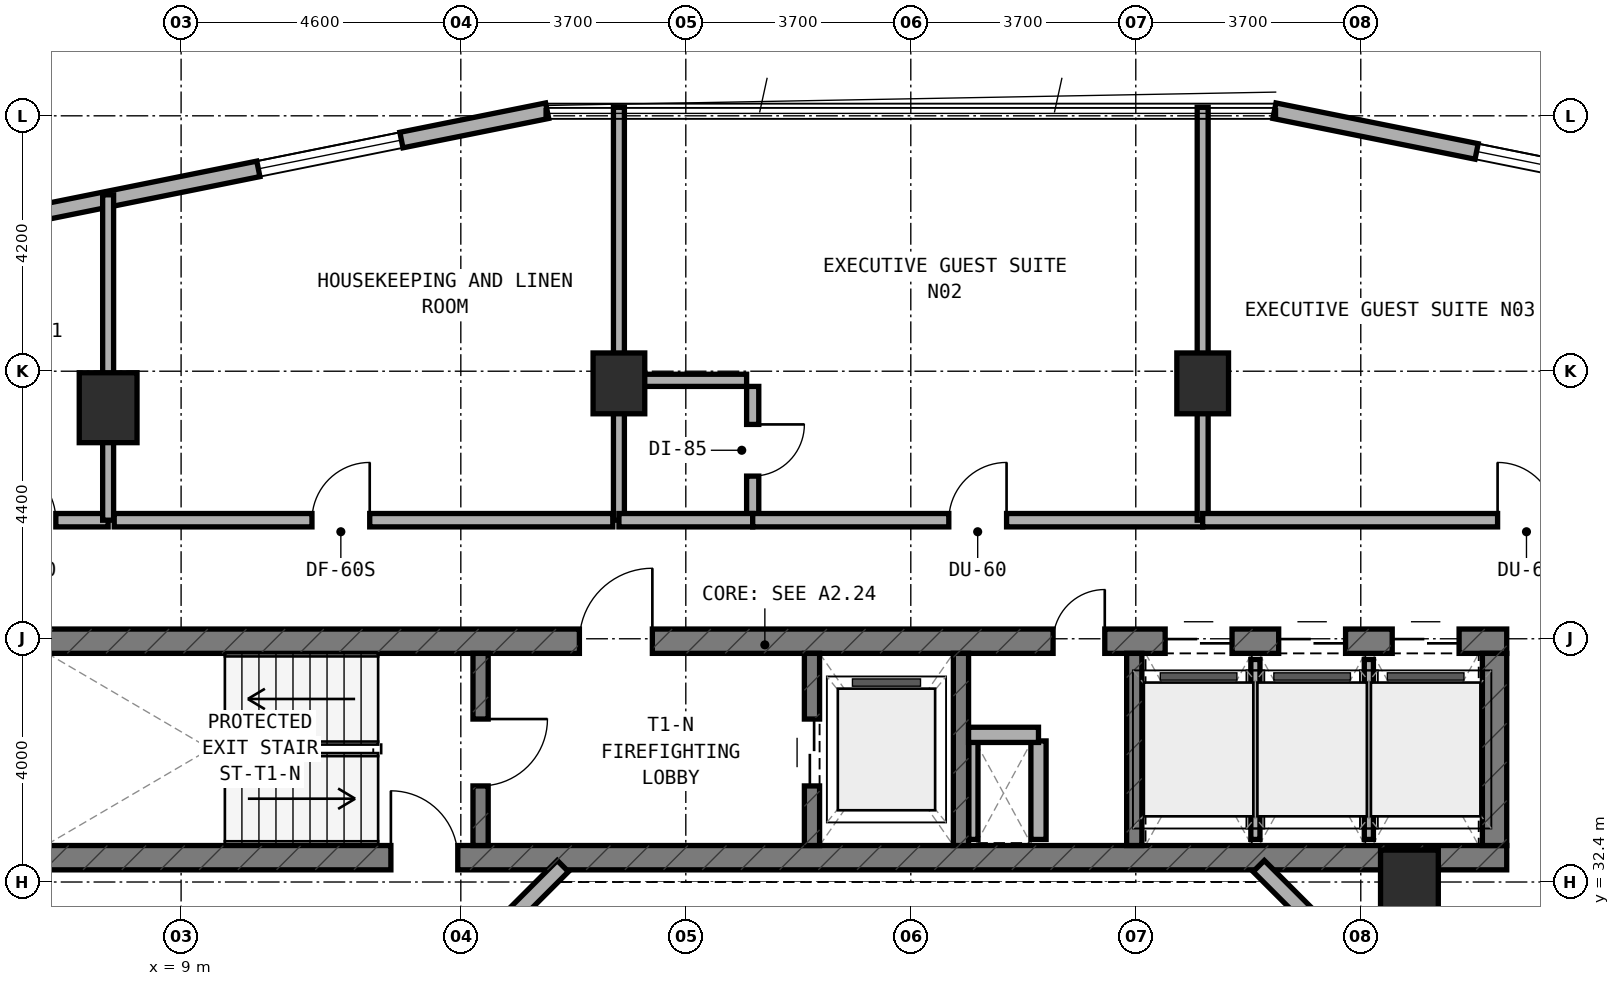
"""IFC4 building model, lengths in metres.
Left out: names, types, materials, properties, quantities, classifications, styles, units other than length and angle.
Written with IfcOpenShell. Run it as: python <this file> out.ifc"""

import sys

from ifc_helpers import new_model, si_unit, direction, frame, frame_2d, origin, origin_2d, place, context, subcontext, project, spatial, rectangle, extrude, element, fill, save


model = new_model("IFC4")
c1 = context("Model", 3, precision=1e-05, world=origin(), true_north=direction((0.0, 1.0)))
c2 = subcontext(c1, "Body", "Model", "MODEL_VIEW")
j1 = project(units=[si_unit("LENGTHUNIT", "METRE"), si_unit("PLANEANGLEUNIT", "RADIAN")], contexts=[c1])
p1 = place(None, origin())
s1 = spatial("IfcSite", under=j1, at=p1, CompositionType="ELEMENT")
p2 = place(p1, origin())
s2 = spatial("IfcBuilding", under=s1, at=p2, CompositionType="ELEMENT")
p3 = place(p2, frame((0.0, 0.0, 109.0)))
s3 = spatial("IfcBuildingStorey", under=s2, at=p3, CompositionType="ELEMENT", Elevation=109.0)
p4 = place(p3, frame((6.4, 32.8, 0.0), z_axis=(0.0, 0.0, 1.0), x_axis=(1.0, 0.0, 0.0)))
e1 = element("IfcWall", 1, at=p4, inside=s3, PredefinedType="SHEAR", context=c2, shape_type="SweptSolid", body=[
    extrude(rectangle(XDim=24.4, YDim=0.4, at=frame_2d((12.2, 0.0))), origin(), (0.0, 0.0, 1.0), 3.5),
])
p5 = place(p4, frame((6.05, 0.0, 0.0)))
e2 = element("IfcOpeningElement", 2, at=p5, cuts=e1, PredefinedType="OPENING", context=c2, shape_type="SweptSolid", body=[
    extrude(rectangle(XDim=1.1, YDim=2.15, at=frame_2d((0.55, 1.075))), frame((0.0, 0.21, 0.0), z_axis=(0.0, -1.0, 0.0), x_axis=(1.0, 0.0, 0.0)), (0.0, 0.0, 1.0), 0.42),
])
p6 = place(p3, frame((6.4, 36.36, 0.0), z_axis=(0.0, 0.0, 1.0), x_axis=(1.0, 0.0, 0.0)))
e3 = element("IfcWall", 3, at=p6, inside=s3, PredefinedType="SHEAR", context=c2, shape_type="SweptSolid", body=[
    extrude(rectangle(XDim=24.4, YDim=0.4, at=frame_2d((12.2, 0.0))), origin(), (0.0, 0.0, 1.0), 3.5),
])
p7 = place(p6, frame((9.15, 0.0, 0.0)))
e4 = element("IfcOpeningElement", 4, at=p7, cuts=e3, PredefinedType="OPENING", context=c2, shape_type="SweptSolid", body=[
    extrude(rectangle(XDim=1.2, YDim=2.15, at=frame_2d((0.6, 1.075))), frame((0.0, 0.21, 0.0), z_axis=(0.0, -1.0, 0.0), x_axis=(1.0, 0.0, 0.0)), (0.0, 0.0, 1.0), 0.42),
])
p8 = place(p6, frame((16.94, 0.0, 0.0)))
e5 = element("IfcOpeningElement", 5, at=p8, cuts=e3, PredefinedType="OPENING", context=c2, shape_type="SweptSolid", body=[
    extrude(rectangle(XDim=0.85, YDim=2.1, at=frame_2d((0.425, 1.05))), frame((0.0, 0.21, 0.0), z_axis=(0.0, -1.0, 0.0), x_axis=(1.0, 0.0, 0.0)), (0.0, 0.0, 1.0), 0.42),
])
p9 = place(p6, frame((18.783, 0.0, 0.0)))
e6 = element("IfcOpeningElement", 6, at=p9, cuts=e3, PredefinedType="OPENING", context=c2, shape_type="SweptSolid", body=[
    extrude(rectangle(XDim=1.1, YDim=2.15, at=frame_2d((0.55, 1.075))), frame((0.0, 0.21, 0.0), z_axis=(0.0, -1.0, 0.0), x_axis=(1.0, 0.0, 0.0)), (0.0, 0.0, 1.0), 0.42),
])
p10 = place(p6, frame((20.65, 0.0, 0.0)))
e7 = element("IfcOpeningElement", 7, at=p10, cuts=e3, PredefinedType="OPENING", context=c2, shape_type="SweptSolid", body=[
    extrude(rectangle(XDim=1.1, YDim=2.15, at=frame_2d((0.55, 1.075))), frame((0.0, 0.21, 0.0), z_axis=(0.0, -1.0, 0.0), x_axis=(1.0, 0.0, 0.0)), (0.0, 0.0, 1.0), 0.42),
])
p11 = place(p6, frame((22.517, 0.0, 0.0)))
e8 = element("IfcOpeningElement", 8, at=p11, cuts=e3, PredefinedType="OPENING", context=c2, shape_type="SweptSolid", body=[
    extrude(rectangle(XDim=1.1, YDim=2.15, at=frame_2d((0.55, 1.075))), frame((0.0, 0.21, 0.0), z_axis=(0.0, -1.0, 0.0), x_axis=(1.0, 0.0, 0.0)), (0.0, 0.0, 1.0), 0.42),
])
p12 = place(p3, frame((30.6, 33.0, 0.0), z_axis=(0.0, 0.0, 1.0), x_axis=(0.0, 1.0, 0.0)))
e9 = element("IfcWall", 9, at=p12, inside=s3, PredefinedType="SHEAR", context=c2, shape_type="SweptSolid", body=[
    extrude(rectangle(XDim=3.16, YDim=0.4, at=frame_2d((1.58, 0.0))), origin(), (0.0, 0.0, 1.0), 3.5),
])
p13 = place(p3, frame((13.925, 33.0, 0.0), z_axis=(0.0, 0.0, 1.0), x_axis=(0.0, 1.0, 0.0)))
e10 = element("IfcWall", 10, at=p13, inside=s3, PredefinedType="STANDARD", context=c2, shape_type="SweptSolid", body=[
    extrude(rectangle(XDim=3.16, YDim=0.25, at=frame_2d((1.58, 0.0))), origin(), (0.0, 0.0, 1.0), 3.22),
])
p14 = place(p13, frame((0.98, 0.0, 0.0)))
e11 = element("IfcOpeningElement", 11, at=p14, cuts=e10, PredefinedType="OPENING", context=c2, shape_type="SweptSolid", body=[
    extrude(rectangle(XDim=1.1, YDim=2.15, at=frame_2d((0.55, 1.075))), frame((0.0, 0.135, 0.0), z_axis=(0.0, -1.0, 0.0), x_axis=(1.0, 0.0, 0.0)), (0.0, 0.0, 1.0), 0.27),
])
p15 = place(p3, frame((19.375, 33.0, 0.0), z_axis=(0.0, 0.0, 1.0), x_axis=(0.0, 1.0, 0.0)))
e12 = element("IfcWall", 12, at=p15, inside=s3, PredefinedType="STANDARD", context=c2, shape_type="SweptSolid", body=[
    extrude(rectangle(XDim=3.16, YDim=0.25, at=frame_2d((1.58, 0.0))), origin(), (0.0, 0.0, 1.0), 3.22),
])
p16 = place(p15, frame((0.98, 0.0, 0.0)))
e13 = element("IfcOpeningElement", 13, at=p16, cuts=e12, PredefinedType="OPENING", context=c2, shape_type="SweptSolid", body=[
    extrude(rectangle(XDim=1.1, YDim=2.15, at=frame_2d((0.55, 1.075))), frame((0.0, 0.135, 0.0), z_axis=(0.0, -1.0, 0.0), x_axis=(1.0, 0.0, 0.0)), (0.0, 0.0, 1.0), 0.27),
])
for number, where, z_axis, x_axis in (
    (14, (21.825, 33.0, 0.0), (0.0, 0.0, 1.0), (0.0, 1.0, 0.0)),
    (15, (24.675, 33.0, 0.0), (0.0, 0.0, 1.0), (0.0, 1.0, 0.0)),
):
    element("IfcWall", number, at=place(p3, frame(where, z_axis=z_axis, x_axis=x_axis)), inside=s3, PredefinedType="STANDARD", context=c2, shape_type="SweptSolid", body=[
        extrude(rectangle(XDim=3.16, YDim=0.25, at=frame_2d((1.58, 0.0))), origin(), (0.0, 0.0, 1.0), 3.22),
    ])
for number, where, z_axis, x_axis in (
    (16, (16.2, 40.6, 0.0), (0.0, 0.0, 1.0), (1.0, 0.0, 0.0)),
    (17, (25.8, 40.6, 0.0), (0.0, 0.0, 1.0), (1.0, 0.0, 0.0)),
):
    element("IfcColumn", number, at=place(p3, frame(where, z_axis=z_axis, x_axis=x_axis)), inside=s3, PredefinedType="COLUMN", context=c2, shape_type="SweptSolid", body=[
        extrude(rectangle(XDim=0.85, YDim=1.0, at=origin_2d()), origin(), (0.0, 0.0, 1.0), 3.5),
    ])
for number, where, z_axis, x_axis in (
    (18, (7.8, 40.2, 0.0), (0.0, 0.0, 1.0), (1.0, 0.0, 0.0)),
    (19, (29.2, 32.35, 0.0), (0.0, 0.0, 1.0), (1.0, 0.0, 0.0)),
):
    element("IfcColumn", number, at=place(p3, frame(where, z_axis=z_axis, x_axis=x_axis)), inside=s3, PredefinedType="COLUMN", context=c2, shape_type="SweptSolid", body=[
        extrude(rectangle(XDim=0.95, YDim=1.15, at=origin_2d()), origin(), (0.0, 0.0, 1.0), 3.5),
    ])
p17 = place(p3, frame((35.982, 43.271, 0.0), z_axis=(0.0, 0.0, 1.0), x_axis=(-0.980315963543, 0.197435082048, 0.0)))
e20 = element("IfcWall", 20, at=p17, inside=s3, PredefinedType="STANDARD", context=c2, shape_type="SweptSolid", body=[
    extrude(rectangle(XDim=9.183, YDim=0.26, at=frame_2d((4.591, 0.0))), origin(), (0.0, 0.0, 1.0), 3.22),
])
p18 = place(p17, frame((3.391, 0.0, 0.8)))
e21 = element("IfcOpeningElement", 21, at=p18, cuts=e20, PredefinedType="OPENING", context=c2, shape_type="SweptSolid", body=[
    extrude(rectangle(XDim=2.4, YDim=1.6, at=frame_2d((1.2, 0.8))), frame((0.0, 0.14, 0.0), z_axis=(0.0, -1.0, 0.0), x_axis=(1.0, 0.0, 0.0)), (0.0, 0.0, 1.0), 0.28),
])
p19 = place(p3, frame((15.02, 45.084, 0.0), z_axis=(0.0, 0.0, 1.0), x_axis=(-0.980315963543, -0.197435082048, 0.0)))
e22 = element("IfcWall", 22, at=p19, inside=s3, PredefinedType="STANDARD", context=c2, shape_type="SweptSolid", body=[
    extrude(rectangle(XDim=9.183, YDim=0.26, at=frame_2d((4.591, 0.0))), origin(), (0.0, 0.0, 1.0), 3.22),
])
p20 = place(p19, frame((2.445, 0.0, 0.8)))
e23 = element("IfcOpeningElement", 23, at=p20, cuts=e22, PredefinedType="OPENING", context=c2, shape_type="SweptSolid", body=[
    extrude(rectangle(XDim=2.4, YDim=1.6, at=frame_2d((1.2, 0.8))), frame((0.0, 0.14, 0.0), z_axis=(0.0, -1.0, 0.0), x_axis=(1.0, 0.0, 0.0)), (0.0, 0.0, 1.0), 0.28),
])
for number, where, z_axis, x_axis in (
    (24, (28.556, 30.828, 0.0), (0.0, 0.0, 1.0), (-0.707, 0.707, 0.0)),
    (25, (15.278, 32.662, 0.0), (0.0, 0.0, 1.0), (-0.707, -0.707, 0.0)),
):
    element("IfcWall", number, at=place(p3, frame(where, z_axis=z_axis, x_axis=x_axis)), inside=s3, PredefinedType="STANDARD", context=c2, shape_type="SweptSolid", body=[
        extrude(rectangle(XDim=2.594, YDim=0.26, at=frame_2d((1.297, 0.0))), origin(), (0.0, 0.0, 1.0), 3.22),
    ])
p21 = place(p3, frame((22.03, 33.1, 0.0), z_axis=(0.0, 0.0, 1.0), x_axis=(0.0, 1.0, 0.0)))
e26 = element("IfcWall", 26, at=p21, inside=s3, PredefinedType="PARTITIONING", context=c2, shape_type="SweptSolid", body=[
    extrude(rectangle(XDim=1.62, YDim=0.15, at=frame_2d((0.81, 0.0))), origin(), (0.0, 0.0, 1.0), 3.22),
])
p22 = place(p3, frame((23.1, 33.1, 0.0), z_axis=(0.0, 0.0, 1.0), x_axis=(0.0, 1.0, 0.0)))
e27 = element("IfcWall", 27, at=p22, inside=s3, PredefinedType="SOLIDWALL", context=c2, shape_type="SweptSolid", body=[
    extrude(rectangle(XDim=1.62, YDim=0.25, at=frame_2d((0.81, 0.0))), origin(), (0.0, 0.0, 1.0), 3.22),
])
p23 = place(p3, frame((21.95, 34.82, 0.0), z_axis=(0.0, 0.0, 1.0), x_axis=(1.0, 0.0, 0.0)))
e28 = element("IfcWall", 28, at=p23, inside=s3, PredefinedType="SOLIDWALL", context=c2, shape_type="SweptSolid", body=[
    extrude(rectangle(XDim=1.15, YDim=0.25, at=frame_2d((0.575, 0.0))), origin(), (0.0, 0.0, 1.0), 3.22),
])
p24 = place(p3, frame((26.667, 33.1, 0.0), z_axis=(0.0, 0.0, 1.0), x_axis=(0.0, 1.0, 0.0)))
e29 = element("IfcWall", 29, at=p24, inside=s3, PredefinedType="PARTITIONING", context=c2, shape_type="SweptSolid", body=[
    extrude(rectangle(XDim=2.96, YDim=0.15, at=frame_2d((1.48, 0.0))), origin(), (0.0, 0.0, 1.0), 3.22),
])
p25 = place(p3, frame((28.533, 33.1, 0.0), z_axis=(0.0, 0.0, 1.0), x_axis=(0.0, 1.0, 0.0)))
e30 = element("IfcWall", 30, at=p25, inside=s3, PredefinedType="PARTITIONING", context=c2, shape_type="SweptSolid", body=[
    extrude(rectangle(XDim=2.96, YDim=0.15, at=frame_2d((1.48, 0.0))), origin(), (0.0, 0.0, 1.0), 2.595),
])
p26 = place(p3, frame((5.55, 38.35, 0.0), z_axis=(0.0, 0.0, 1.0), x_axis=(1.0, 0.0, 0.0)))
e31 = element("IfcWall", 31, at=p26, inside=s3, PredefinedType="SOLIDWALL", context=c2, shape_type="SweptSolid", body=[
    extrude(rectangle(XDim=2.25, YDim=0.22, at=frame_2d((1.125, 0.0))), origin(), (0.0, 0.0, 1.0), 2.595),
])
p27 = place(p26, frame((0.44, 0.0, 0.0)))
e32 = element("IfcOpeningElement", 32, at=p27, cuts=e31, PredefinedType="OPENING", context=c2, shape_type="SweptSolid", body=[
    extrude(rectangle(XDim=0.95, YDim=2.1, at=frame_2d((0.475, 1.05))), frame((0.0, 0.12, 0.0), z_axis=(0.0, -1.0, 0.0), x_axis=(1.0, 0.0, 0.0)), (0.0, 0.0, 1.0), 0.24),
])
p28 = place(p3, frame((7.8, 38.35, 0.0), z_axis=(0.0, 0.0, 1.0), x_axis=(0.0, 1.0, 0.0)))
e33 = element("IfcWall", 33, at=p28, inside=s3, PredefinedType="SOLIDWALL", context=c2, shape_type="SweptSolid", body=[
    extrude(rectangle(XDim=5.351, YDim=0.18, at=frame_2d((2.675, 0.0))), origin(), (0.0, 0.0, 1.0), 2.595),
])
p29 = place(p3, frame((7.9, 38.35, 0.0), z_axis=(0.0, 0.0, 1.0), x_axis=(1.0, 0.0, 0.0)))
e34 = element("IfcWall", 34, at=p29, inside=s3, PredefinedType="SOLIDWALL", context=c2, shape_type="SweptSolid", body=[
    extrude(rectangle(XDim=8.2, YDim=0.22, at=frame_2d((4.1, 0.0))), origin(), (0.0, 0.0, 1.0), 3.22),
])
p30 = place(p29, frame((3.252, 0.0, 0.0)))
e35 = element("IfcOpeningElement", 35, at=p30, cuts=e34, PredefinedType="OPENING", context=c2, shape_type="SweptSolid", body=[
    extrude(rectangle(XDim=0.95, YDim=2.1, at=frame_2d((0.475, 1.05))), frame((0.0, 0.12, 0.0), z_axis=(0.0, -1.0, 0.0), x_axis=(1.0, 0.0, 0.0)), (0.0, 0.0, 1.0), 0.24),
])
p31 = place(p3, frame((16.2, 38.35, 0.0), z_axis=(0.0, 0.0, 1.0), x_axis=(0.0, 1.0, 0.0)))
e36 = element("IfcWall", 36, at=p31, inside=s3, PredefinedType="SOLIDWALL", context=c2, shape_type="SweptSolid", body=[
    extrude(rectangle(XDim=6.79, YDim=0.18, at=frame_2d((3.395, 0.0))), origin(), (0.0, 0.0, 1.0), 2.595),
])
p32 = place(p3, frame((18.4, 38.45, 0.0), z_axis=(0.0, 0.0, 1.0), x_axis=(0.0, 1.0, 0.0)))
e37 = element("IfcWall", 37, at=p32, inside=s3, PredefinedType="PLUMBINGWALL", context=c2, shape_type="SweptSolid", body=[
    extrude(rectangle(XDim=2.1, YDim=0.2, at=frame_2d((1.05, 0.0))), origin(), (0.0, 0.0, 1.0), 2.835),
])
p33 = place(p32, frame((0.625, 0.0, 0.0)))
e38 = element("IfcOpeningElement", 38, at=p33, cuts=e37, PredefinedType="OPENING", context=c2, shape_type="SweptSolid", body=[
    extrude(rectangle(XDim=0.85, YDim=2.1, at=frame_2d((0.425, 1.05))), frame((0.0, 0.11, 0.0), z_axis=(0.0, -1.0, 0.0), x_axis=(1.0, 0.0, 0.0)), (0.0, 0.0, 1.0), 0.22),
])
p34 = place(p3, frame((16.3, 40.65, 0.0), z_axis=(0.0, 0.0, 1.0), x_axis=(1.0, 0.0, 0.0)))
e39 = element("IfcWall", 39, at=p34, inside=s3, PredefinedType="PLUMBINGWALL", context=c2, shape_type="SweptSolid", body=[
    extrude(rectangle(XDim=2.0, YDim=0.2, at=frame_2d((1.0, 0.0))), origin(), (0.0, 0.0, 1.0), 2.835),
])
p35 = place(p3, frame((16.2, 38.35, 0.0), z_axis=(0.0, 0.0, 1.0), x_axis=(1.0, 0.0, 0.0)))
e40 = element("IfcWall", 40, at=p35, inside=s3, PredefinedType="SOLIDWALL", context=c2, shape_type="SweptSolid", body=[
    extrude(rectangle(XDim=2.2, YDim=0.22, at=frame_2d((1.1, 0.0))), origin(), (0.0, 0.0, 1.0), 2.595),
])
p36 = place(p3, frame((18.4, 38.35, 0.0), z_axis=(0.0, 0.0, 1.0), x_axis=(1.0, 0.0, 0.0)))
e41 = element("IfcWall", 41, at=p36, inside=s3, PredefinedType="SOLIDWALL", context=c2, shape_type="SweptSolid", body=[
    extrude(rectangle(XDim=7.4, YDim=0.22, at=frame_2d((3.7, 0.0))), origin(), (0.0, 0.0, 1.0), 2.595),
])
p37 = place(p36, frame((3.225, 0.0, 0.0)))
e42 = element("IfcOpeningElement", 42, at=p37, cuts=e41, PredefinedType="OPENING", context=c2, shape_type="SweptSolid", body=[
    extrude(rectangle(XDim=0.95, YDim=2.1, at=frame_2d((0.475, 1.05))), frame((0.0, 0.12, 0.0), z_axis=(0.0, -1.0, 0.0), x_axis=(1.0, 0.0, 0.0)), (0.0, 0.0, 1.0), 0.24),
])
p38 = place(p3, frame((25.8, 38.35, 0.0), z_axis=(0.0, 0.0, 1.0), x_axis=(0.0, 1.0, 0.0)))
e43 = element("IfcWall", 43, at=p38, inside=s3, PredefinedType="SOLIDWALL", context=c2, shape_type="SweptSolid", body=[
    extrude(rectangle(XDim=6.79, YDim=0.18, at=frame_2d((3.395, 0.0))), origin(), (0.0, 0.0, 1.0), 2.595),
])
p39 = place(p3, frame((25.8, 38.35, 0.0), z_axis=(0.0, 0.0, 1.0), x_axis=(1.0, 0.0, 0.0)))
e44 = element("IfcWall", 44, at=p39, inside=s3, PredefinedType="SOLIDWALL", context=c2, shape_type="SweptSolid", body=[
    extrude(rectangle(XDim=10.65, YDim=0.22, at=frame_2d((5.325, 0.0))), origin(), (0.0, 0.0, 1.0), 2.595),
])
p40 = place(p39, frame((4.85, 0.0, 0.0)))
e45 = element("IfcOpeningElement", 45, at=p40, cuts=e44, PredefinedType="OPENING", context=c2, shape_type="SweptSolid", body=[
    extrude(rectangle(XDim=0.95, YDim=2.1, at=frame_2d((0.475, 1.05))), frame((0.0, 0.12, 0.0), z_axis=(0.0, -1.0, 0.0), x_axis=(1.0, 0.0, 0.0)), (0.0, 0.0, 1.0), 0.24),
])
p41 = place(p18, origin())
e46 = element("IfcWindow", 46, at=p41, inside=s3, PartitioningType="SINGLE_PANEL", PredefinedType="WINDOW", context=c2, shape_type="SweptSolid", body=[
    extrude(rectangle(XDim=2.4, YDim=1.6, at=frame_2d((1.2, 0.8))), frame((0.0, 0.03, 0.0), z_axis=(0.0, -1.0, 0.0), x_axis=(1.0, 0.0, 0.0)), (0.0, 0.0, 1.0), 0.06),
])
fill(e21, e46)
p42 = place(p20, origin())
e47 = element("IfcWindow", 47, at=p42, inside=s3, PartitioningType="SINGLE_PANEL", PredefinedType="WINDOW", context=c2, shape_type="SweptSolid", body=[
    extrude(rectangle(XDim=2.4, YDim=1.6, at=frame_2d((1.2, 0.8))), frame((0.0, 0.03, 0.0), z_axis=(0.0, -1.0, 0.0), x_axis=(1.0, 0.0, 0.0)), (0.0, 0.0, 1.0), 0.06),
])
fill(e23, e47)
p43 = place(p14, frame((1.1, 0.0, 0.0), z_axis=(0.0, 0.0, 1.0), x_axis=(-1.0, 0.0, 0.0)))
e48 = element("IfcDoor", 48, at=p43, inside=s3, OperationType="SINGLE_SWING_LEFT", PredefinedType="DOOR", context=c2, shape_type="SweptSolid", body=[
    extrude(rectangle(XDim=1.1, YDim=2.15, at=frame_2d((0.55, 1.075))), frame((0.0, 0.025, 0.0), z_axis=(0.0, -1.0, 0.0), x_axis=(1.0, 0.0, 0.0)), (0.0, 0.0, 1.0), 0.05),
])
fill(e11, e48)
p44 = place(p7, origin())
e49 = element("IfcDoor", 49, at=p44, inside=s3, OperationType="SINGLE_SWING_RIGHT", PredefinedType="DOOR", context=c2, shape_type="SweptSolid", body=[
    extrude(rectangle(XDim=1.2, YDim=2.15, at=frame_2d((0.6, 1.075))), frame((0.0, 0.025, 0.0), z_axis=(0.0, -1.0, 0.0), x_axis=(1.0, 0.0, 0.0)), (0.0, 0.0, 1.0), 0.05),
])
fill(e4, e49)
p45 = place(p16, origin())
e50 = element("IfcDoor", 50, at=p45, inside=s3, OperationType="DOUBLE_DOOR_SLIDING", PredefinedType="DOOR", context=c2, shape_type="SweptSolid", body=[
    extrude(rectangle(XDim=1.1, YDim=2.15, at=frame_2d((0.55, 1.075))), frame((0.0, 0.025, 0.0), z_axis=(0.0, -1.0, 0.0), x_axis=(1.0, 0.0, 0.0)), (0.0, 0.0, 1.0), 0.05),
])
fill(e13, e50)
p46 = place(p8, origin())
e51 = element("IfcDoor", 51, at=p46, inside=s3, OperationType="SINGLE_SWING_RIGHT", PredefinedType="DOOR", context=c2, shape_type="SweptSolid", body=[
    extrude(rectangle(XDim=0.85, YDim=2.1, at=frame_2d((0.425, 1.05))), frame((0.0, 0.025, 0.0), z_axis=(0.0, -1.0, 0.0), x_axis=(1.0, 0.0, 0.0)), (0.0, 0.0, 1.0), 0.05),
])
fill(e5, e51)
p47 = place(p9, origin())
e52 = element("IfcDoor", 52, at=p47, inside=s3, OperationType="DOUBLE_DOOR_SLIDING", PredefinedType="DOOR", context=c2, shape_type="SweptSolid", body=[
    extrude(rectangle(XDim=1.1, YDim=2.15, at=frame_2d((0.55, 1.075))), frame((0.0, 0.025, 0.0), z_axis=(0.0, -1.0, 0.0), x_axis=(1.0, 0.0, 0.0)), (0.0, 0.0, 1.0), 0.05),
])
fill(e6, e52)
p48 = place(p10, origin())
e53 = element("IfcDoor", 53, at=p48, inside=s3, OperationType="DOUBLE_DOOR_SLIDING", PredefinedType="DOOR", context=c2, shape_type="SweptSolid", body=[
    extrude(rectangle(XDim=1.1, YDim=2.15, at=frame_2d((0.55, 1.075))), frame((0.0, 0.025, 0.0), z_axis=(0.0, -1.0, 0.0), x_axis=(1.0, 0.0, 0.0)), (0.0, 0.0, 1.0), 0.05),
])
fill(e7, e53)
p49 = place(p11, origin())
e54 = element("IfcDoor", 54, at=p49, inside=s3, OperationType="DOUBLE_DOOR_SLIDING", PredefinedType="DOOR", context=c2, shape_type="SweptSolid", body=[
    extrude(rectangle(XDim=1.1, YDim=2.15, at=frame_2d((0.55, 1.075))), frame((0.0, 0.025, 0.0), z_axis=(0.0, -1.0, 0.0), x_axis=(1.0, 0.0, 0.0)), (0.0, 0.0, 1.0), 0.05),
])
fill(e8, e54)
p50 = place(p5, origin())
e55 = element("IfcDoor", 55, at=p50, inside=s3, OperationType="SINGLE_SWING_LEFT", PredefinedType="DOOR", context=c2, shape_type="SweptSolid", body=[
    extrude(rectangle(XDim=1.1, YDim=2.15, at=frame_2d((0.55, 1.075))), frame((0.0, 0.025, 0.0), z_axis=(0.0, -1.0, 0.0), x_axis=(1.0, 0.0, 0.0)), (0.0, 0.0, 1.0), 0.05),
])
fill(e2, e55)
p51 = place(p27, origin())
e56 = element("IfcDoor", 56, at=p51, inside=s3, OperationType="SINGLE_SWING_LEFT", PredefinedType="DOOR", context=c2, shape_type="SweptSolid", body=[
    extrude(rectangle(XDim=0.95, YDim=2.1, at=frame_2d((0.475, 1.05))), frame((0.0, 0.025, 0.0), z_axis=(0.0, -1.0, 0.0), x_axis=(1.0, 0.0, 0.0)), (0.0, 0.0, 1.0), 0.05),
])
fill(e32, e56)
p52 = place(p30, origin())
e57 = element("IfcDoor", 57, at=p52, inside=s3, OperationType="SINGLE_SWING_RIGHT", PredefinedType="DOOR", context=c2, shape_type="SweptSolid", body=[
    extrude(rectangle(XDim=0.95, YDim=2.1, at=frame_2d((0.475, 1.05))), frame((0.0, 0.025, 0.0), z_axis=(0.0, -1.0, 0.0), x_axis=(1.0, 0.0, 0.0)), (0.0, 0.0, 1.0), 0.05),
])
fill(e35, e57)
p53 = place(p33, frame((0.85, 0.0, 0.0), z_axis=(0.0, 0.0, 1.0), x_axis=(-1.0, 0.0, 0.0)))
e58 = element("IfcDoor", 58, at=p53, inside=s3, OperationType="SINGLE_SWING_LEFT", PredefinedType="DOOR", context=c2, shape_type="SweptSolid", body=[
    extrude(rectangle(XDim=0.85, YDim=2.1, at=frame_2d((0.425, 1.05))), frame((0.0, 0.025, 0.0), z_axis=(0.0, -1.0, 0.0), x_axis=(1.0, 0.0, 0.0)), (0.0, 0.0, 1.0), 0.05),
])
fill(e38, e58)
p54 = place(p37, origin())
e59 = element("IfcDoor", 59, at=p54, inside=s3, OperationType="SINGLE_SWING_RIGHT", PredefinedType="DOOR", context=c2, shape_type="SweptSolid", body=[
    extrude(rectangle(XDim=0.95, YDim=2.1, at=frame_2d((0.475, 1.05))), frame((0.0, 0.025, 0.0), z_axis=(0.0, -1.0, 0.0), x_axis=(1.0, 0.0, 0.0)), (0.0, 0.0, 1.0), 0.05),
])
fill(e42, e59)
p55 = place(p40, origin())
e60 = element("IfcDoor", 60, at=p55, inside=s3, OperationType="SINGLE_SWING_LEFT", PredefinedType="DOOR", context=c2, shape_type="SweptSolid", body=[
    extrude(rectangle(XDim=0.95, YDim=2.1, at=frame_2d((0.475, 1.05))), frame((0.0, 0.025, 0.0), z_axis=(0.0, -1.0, 0.0), x_axis=(1.0, 0.0, 0.0)), (0.0, 0.0, 1.0), 0.05),
])
fill(e45, e60)
save(model, sys.argv[1])
